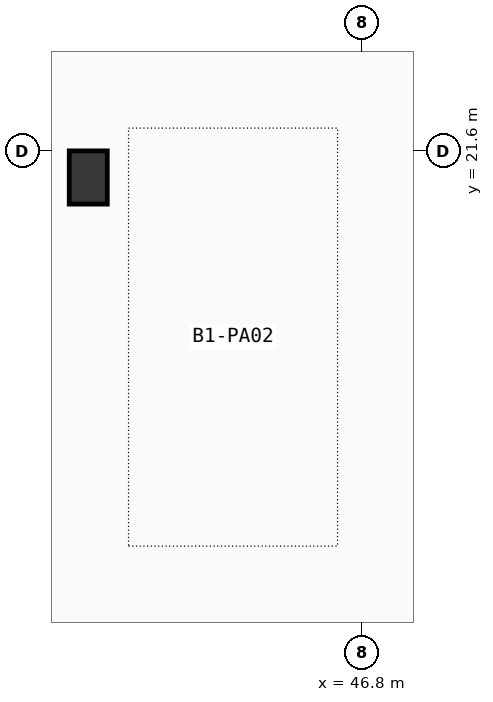
"""IFC4 building model, lengths in metres.
Left out: names, types, materials, properties, quantities, classifications, styles, units other than length and angle.
Written with IfcOpenShell. Run it as: python <this file> out.ifc"""

import sys

from ifc_helpers import new_model, si_unit, direction, frame, origin, origin_2d, place, context, subcontext, project, spatial, rectangle, extrude, element, save


model = new_model("IFC4")
c1 = context("Model", 3, precision=1e-05, world=origin(), true_north=direction((0.0, 1.0)))
c2 = subcontext(c1, "Body", "Model", "MODEL_VIEW")
j1 = project(units=[si_unit("LENGTHUNIT", "METRE"), si_unit("PLANEANGLEUNIT", "RADIAN")], contexts=[c1])
p1 = place(None, origin())
s1 = spatial("IfcSite", under=j1, at=p1, CompositionType="ELEMENT")
p2 = place(p1, origin())
s2 = spatial("IfcBuilding", under=s1, at=p2, CompositionType="ELEMENT")
p3 = place(p2, frame((0.0, 0.0, -4.2)))
s3 = spatial("IfcBuildingStorey", under=s2, at=p3, CompositionType="ELEMENT", Elevation=-4.2)
p4 = place(p3, frame((43.2, 21.25, 0.0), z_axis=(0.0, 0.0, 1.0), x_axis=(1.0, 0.0, 0.0)))
e1 = element("IfcColumn", 1, at=p4, inside=s3, PredefinedType="COLUMN", context=c2, shape_type="SweptSolid", body=[
    extrude(rectangle(XDim=0.5, YDim=0.7, at=origin_2d()), origin(), (0.0, 0.0, 1.0), 4.2),
])
save(model, sys.argv[1])
